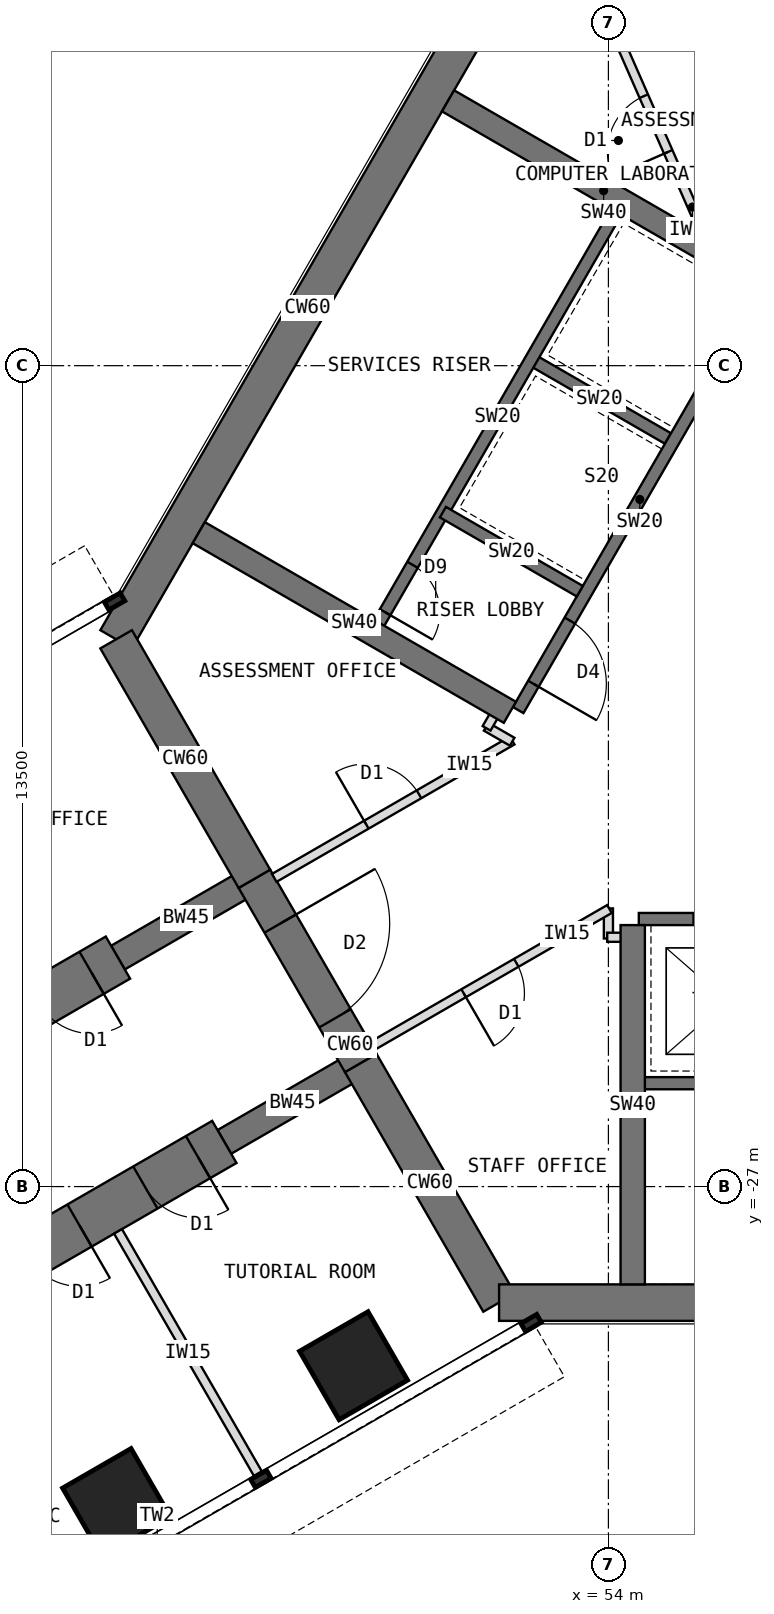
"""IFC4 building model, lengths in metres.
Left out: names, types, materials, properties, quantities, classifications, styles, units other than length and angle.
Written with IfcOpenShell. Run it as: python <this file> out.ifc"""

import sys

from ifc_helpers import new_model, si_unit, direction, frame, frame_2d, origin, origin_2d, place, context, subcontext, project, spatial, rectangle, extrude, element, fill, save


model = new_model("IFC4")
c1 = context("Model", 3, precision=1e-05, world=origin(), true_north=direction((0.0, 1.0)))
c2 = subcontext(c1, "Body", "Model", "MODEL_VIEW")
j1 = project(units=[si_unit("LENGTHUNIT", "METRE"), si_unit("PLANEANGLEUNIT", "RADIAN")], contexts=[c1])
p1 = place(None, origin())
s1 = spatial("IfcSite", under=j1, at=p1, CompositionType="ELEMENT")
p2 = place(p1, origin())
s2 = spatial("IfcBuilding", under=s1, at=p2, CompositionType="ELEMENT")
p3 = place(p2, frame((0.0, 0.0, 125.5)))
s3 = spatial("IfcBuildingStorey", under=s2, at=p3, CompositionType="ELEMENT", Elevation=125.5)
p4 = place(p3, frame((52.202, -7.092, 0.0), z_axis=(0.0, 0.0, 1.0), x_axis=(-0.500005998175, -0.866021940709, 0.0)))
e1 = element("IfcWall", 1, at=p4, inside=s3, PredefinedType="SHEAR", context=c2, shape_type="SweptSolid", body=[
    extrude(rectangle(XDim=12.596, YDim=0.6, at=frame_2d((6.298, 0.0))), origin(), (0.0, 0.0, 1.0), 4.0),
])
p5 = place(p3, frame((45.904, -18.0, 0.0), z_axis=(0.0, 0.0, 1.0), x_axis=(0.500024481964, -0.866011268655, 0.0)))
e2 = element("IfcWall", 2, at=p5, inside=s3, PredefinedType="SHEAR", context=c2, shape_type="SweptSolid", body=[
    extrude(rectangle(XDim=4.548, YDim=0.6, at=frame_2d((2.274, 0.0))), origin(), (0.0, 0.0, 1.0), 4.0),
])
p6 = place(p3, frame((48.178, -21.939, 0.0), z_axis=(0.0, 0.0, 1.0), x_axis=(0.500010275428, -0.866019471182, 0.0)))
e3 = element("IfcWall", 3, at=p6, inside=s3, PredefinedType="SHEAR", context=c2, shape_type="SweptSolid", body=[
    extrude(rectangle(XDim=3.5, YDim=0.6, at=frame_2d((1.75, 0.0))), origin(), (0.0, 0.0, 1.0), 4.0),
])
p7 = place(p6, frame((0.85, 0.0, 0.0)))
e4 = element("IfcOpeningElement", 4, at=p7, cuts=e3, PredefinedType="OPENING", context=c2, shape_type="SweptSolid", body=[
    extrude(rectangle(XDim=1.8, YDim=2.1, at=frame_2d((0.9, 1.05))), frame((0.0, 0.31, 0.0), z_axis=(0.0, -1.0, 0.0), x_axis=(1.0, 0.0, 0.0)), (0.0, 0.0, 1.0), 0.62),
])
p8 = place(p3, frame((49.928, -24.97, 0.0), z_axis=(0.0, 0.0, 1.0), x_axis=(0.499984222037, -0.866034513004, 0.0)))
e5 = element("IfcWall", 5, at=p8, inside=s3, PredefinedType="SHEAR", context=c2, shape_type="SweptSolid", body=[
    extrude(rectangle(XDim=4.548, YDim=0.6, at=frame_2d((2.274, 0.0))), origin(), (0.0, 0.0, 1.0), 4.0),
])
p9 = place(p3, frame((52.202, -28.908, 0.0), z_axis=(0.0, 0.0, 1.0), x_axis=(1.0, 0.0, 0.0)))
e6 = element("IfcWall", 6, at=p9, inside=s3, PredefinedType="SHEAR", context=c2, shape_type="SweptSolid", body=[
    extrude(rectangle(XDim=12.596, YDim=0.6, at=frame_2d((6.298, 0.0))), origin(), (0.0, 0.0, 1.0), 4.0),
])
p10 = place(p3, frame((49.928, -24.97, 0.0), z_axis=(0.0, 0.0, 1.0), x_axis=(-0.866031863473, -0.499988811324, 0.0)))
e7 = element("IfcWall", 7, at=p10, inside=s3, PredefinedType="SHEAR", context=c2, shape_type="SweptSolid", body=[
    extrude(rectangle(XDim=2.592, YDim=0.45, at=frame_2d((1.296, 0.0))), origin(), (0.0, 0.0, 1.0), 4.0),
])
p11 = place(p3, frame((47.684, -26.266, 0.0), z_axis=(0.0, 0.0, 1.0), x_axis=(-0.866027579429, -0.499996231654, 0.0)))
e8 = element("IfcWall", 8, at=p11, inside=s3, PredefinedType="SHEAR", context=c2, shape_type="SweptSolid", body=[
    extrude(rectangle(XDim=13.2, YDim=0.8, at=frame_2d((6.6, 0.0))), origin(), (0.0, 0.0, 1.0), 4.0),
])
p12 = place(p11, frame((0.5, 0.0, 0.0)))
e9 = element("IfcOpeningElement", 9, at=p12, cuts=e8, PredefinedType="OPENING", context=c2, shape_type="SweptSolid", body=[
    extrude(rectangle(XDim=1.0, YDim=2.1, at=frame_2d((0.5, 1.05))), frame((0.0, 0.41, 0.0), z_axis=(0.0, -1.0, 0.0), x_axis=(1.0, 0.0, 0.0)), (0.0, 0.0, 1.0), 0.82),
])
p13 = place(p11, frame((2.75, 0.0, 0.0)))
e10 = element("IfcOpeningElement", 10, at=p13, cuts=e8, PredefinedType="OPENING", context=c2, shape_type="SweptSolid", body=[
    extrude(rectangle(XDim=1.0, YDim=2.1, at=frame_2d((0.5, 1.05))), frame((0.0, 0.41, 0.0), z_axis=(0.0, -1.0, 0.0), x_axis=(1.0, 0.0, 0.0)), (0.0, 0.0, 1.0), 0.82),
])
p14 = place(p11, frame((7.25, 0.0, 0.0)))
e11 = element("IfcOpeningElement", 11, at=p14, cuts=e8, PredefinedType="OPENING", context=c2, shape_type="SweptSolid", body=[
    extrude(rectangle(XDim=1.0, YDim=2.1, at=frame_2d((0.5, 1.05))), frame((0.0, 0.41, 0.0), z_axis=(0.0, -1.0, 0.0), x_axis=(1.0, 0.0, 0.0)), (0.0, 0.0, 1.0), 0.82),
])
p15 = place(p3, frame((48.178, -21.939, 0.0), z_axis=(0.0, 0.0, 1.0), x_axis=(-0.866072649678, -0.499918158782, 0.0)))
e12 = element("IfcWall", 12, at=p15, inside=s3, PredefinedType="SHEAR", context=c2, shape_type="SweptSolid", body=[
    extrude(rectangle(XDim=2.592, YDim=0.45, at=frame_2d((1.296, 0.0))), origin(), (0.0, 0.0, 1.0), 4.0),
])
p16 = place(p3, frame((45.934, -23.234, 0.0), z_axis=(0.0, 0.0, 1.0), x_axis=(-0.866019570528, -0.500010103361, 0.0)))
e13 = element("IfcWall", 13, at=p16, inside=s3, PredefinedType="SHEAR", context=c2, shape_type="SweptSolid", body=[
    extrude(rectangle(XDim=13.2, YDim=0.8, at=frame_2d((6.6, 0.0))), origin(), (0.0, 0.0, 1.0), 4.0),
])
p17 = place(p16, frame((0.5, 0.0, 0.0)))
e14 = element("IfcOpeningElement", 14, at=p17, cuts=e13, PredefinedType="OPENING", context=c2, shape_type="SweptSolid", body=[
    extrude(rectangle(XDim=1.0, YDim=2.1, at=frame_2d((0.5, 1.05))), frame((0.0, 0.41, 0.0), z_axis=(0.0, -1.0, 0.0), x_axis=(1.0, 0.0, 0.0)), (0.0, 0.0, 1.0), 0.82),
])
p18 = place(p16, frame((2.75, 0.0, 0.0)))
e15 = element("IfcOpeningElement", 15, at=p18, cuts=e13, PredefinedType="OPENING", context=c2, shape_type="SweptSolid", body=[
    extrude(rectangle(XDim=1.0, YDim=2.1, at=frame_2d((0.5, 1.05))), frame((0.0, 0.41, 0.0), z_axis=(0.0, -1.0, 0.0), x_axis=(1.0, 0.0, 0.0)), (0.0, 0.0, 1.0), 0.82),
])
p19 = place(p16, frame((7.25, 0.0, 0.0)))
e16 = element("IfcOpeningElement", 16, at=p19, cuts=e13, PredefinedType="OPENING", context=c2, shape_type="SweptSolid", body=[
    extrude(rectangle(XDim=1.0, YDim=2.1, at=frame_2d((0.5, 1.05))), frame((0.0, 0.41, 0.0), z_axis=(0.0, -1.0, 0.0), x_axis=(1.0, 0.0, 0.0)), (0.0, 0.0, 1.0), 0.82),
])
for number, where, z_axis, x_axis in (
    (17, (49.809, -29.946, 0.0), (0.0, 0.0, 1.0), (0.866, 0.5, 0.0)),
    (18, (45.912, -32.196, 0.0), (0.0, 0.0, 1.0), (0.866, 0.5, 0.0)),
):
    element("IfcColumn", number, at=place(p3, frame(where, z_axis=z_axis, x_axis=x_axis)), inside=s3, PredefinedType="COLUMN", context=c2, shape_type="SweptSolid", body=[
        extrude(rectangle(XDim=1.3, YDim=1.3, at=origin_2d()), origin(), (0.0, 0.0, 1.0), 4.0),
    ])
p20 = place(p3, frame((56.516, -12.236, 0.0), z_axis=(0.0, 0.0, 1.0), x_axis=(-0.49999894854, -0.866026010844, 0.0)))
e19 = element("IfcWall", 19, at=p20, inside=s3, PredefinedType="SHEAR", context=c2, shape_type="SweptSolid", body=[
    extrude(rectangle(XDim=8.0, YDim=0.2, at=frame_2d((4.0, 0.0))), origin(), (0.0, 0.0, 1.0), 4.0),
])
p21 = place(p20, frame((6.3, 0.0, 0.0)))
e20 = element("IfcOpeningElement", 20, at=p21, cuts=e19, PredefinedType="OPENING", context=c2, shape_type="SweptSolid", body=[
    extrude(rectangle(XDim=1.2, YDim=2.1, at=frame_2d((0.6, 1.05))), frame((0.0, 0.11, 0.0), z_axis=(0.0, -1.0, 0.0), x_axis=(1.0, 0.0, 0.0)), (0.0, 0.0, 1.0), 0.22),
])
for number, where, z_axis, x_axis in (
    (21, (54.98, -14.697, 0.0), (0.0, 0.0, 1.0), (-0.866, 0.5, 0.0)),
    (22, (53.53, -17.209, 0.0), (0.0, 0.0, 1.0), (-0.866, 0.5, 0.0)),
):
    element("IfcWall", number, at=place(p3, frame(where, z_axis=z_axis, x_axis=x_axis)), inside=s3, PredefinedType="SHEAR", context=c2, shape_type="SweptSolid", body=[
        extrude(rectangle(XDim=2.6, YDim=0.2, at=frame_2d((1.3, 0.0))), origin(), (0.0, 0.0, 1.0), 4.0),
    ])
p22 = place(p3, frame((54.178, -10.886, 0.0), z_axis=(0.0, 0.0, 1.0), x_axis=(-0.49999894854, -0.866026010844, 0.0)))
e23 = element("IfcWall", 23, at=p22, inside=s3, PredefinedType="SHEAR", context=c2, shape_type="SweptSolid", body=[
    extrude(rectangle(XDim=8.0, YDim=0.2, at=frame_2d((4.0, 0.0))), origin(), (0.0, 0.0, 1.0), 4.0),
])
p23 = place(p22, frame((6.8, 0.0, 0.0)))
e24 = element("IfcOpeningElement", 24, at=p23, cuts=e23, PredefinedType="OPENING", context=c2, shape_type="SweptSolid", body=[
    extrude(rectangle(XDim=0.9, YDim=2.1, at=frame_2d((0.45, 1.05))), frame((0.0, 0.11, 0.0), z_axis=(0.0, -1.0, 0.0), x_axis=(1.0, 0.0, 0.0)), (0.0, 0.0, 1.0), 0.22),
])
p24 = place(p3, frame((52.38, -19.201, 0.0), z_axis=(0.0, 0.0, 1.0), x_axis=(-0.866027317282, 0.49999668571, 0.0)))
e25 = element("IfcWall", 25, at=p24, inside=s3, PredefinedType="SHEAR", context=c2, shape_type="SweptSolid", body=[
    extrude(rectangle(XDim=5.908, YDim=0.4, at=frame_2d((2.954, 0.0))), origin(), (0.0, 0.0, 1.0), 4.0),
])
p25 = place(p3, frame((56.48, -12.099, 0.0), z_axis=(0.0, 0.0, 1.0), x_axis=(-0.866009424208, 0.500027676417, 0.0)))
e26 = element("IfcWall", 26, at=p25, inside=s3, PredefinedType="SHEAR", context=c2, shape_type="SweptSolid", body=[
    extrude(rectangle(XDim=5.908, YDim=0.4, at=frame_2d((2.954, 0.0))), origin(), (0.0, 0.0, 1.0), 4.0),
])
p26 = place(p3, frame((54.5, -22.6, 0.0), z_axis=(0.0, 0.0, 1.0), x_axis=(1.0, 0.0, 0.0)))
e27 = element("IfcWall", 27, at=p26, inside=s3, PredefinedType="SHEAR", context=c2, shape_type="SweptSolid", body=[
    extrude(rectangle(XDim=8.0, YDim=0.2, at=frame_2d((4.0, 0.0))), origin(), (0.0, 0.0, 1.0), 4.0),
])
p27 = place(p26, frame((6.3, 0.0, 0.0)))
e28 = element("IfcOpeningElement", 28, at=p27, cuts=e27, PredefinedType="OPENING", context=c2, shape_type="SweptSolid", body=[
    extrude(rectangle(XDim=1.2, YDim=2.1, at=frame_2d((0.6, 1.05))), frame((0.0, 0.11, 0.0), z_axis=(0.0, -1.0, 0.0), x_axis=(1.0, 0.0, 0.0)), (0.0, 0.0, 1.0), 0.22),
])
p28 = place(p26, frame((0.9, 0.0, 0.0)))
e29 = element("IfcOpeningElement", 29, at=p28, cuts=e27, PredefinedType="OPENING", context=c2, shape_type="SweptSolid", body=[
    extrude(rectangle(XDim=1.1, YDim=2.2, at=frame_2d((0.55, 1.1))), frame((0.0, 0.11, 0.0), z_axis=(0.0, -1.0, 0.0), x_axis=(1.0, 0.0, 0.0)), (0.0, 0.0, 1.0), 0.22),
])
p29 = place(p3, frame((54.5, -25.3, 0.0), z_axis=(0.0, 0.0, 1.0), x_axis=(1.0, 0.0, 0.0)))
e30 = element("IfcWall", 30, at=p29, inside=s3, PredefinedType="SHEAR", context=c2, shape_type="SweptSolid", body=[
    extrude(rectangle(XDim=8.0, YDim=0.2, at=frame_2d((4.0, 0.0))), origin(), (0.0, 0.0, 1.0), 4.0),
])
p30 = place(p29, frame((6.7, 0.0, 0.0)))
e31 = element("IfcOpeningElement", 31, at=p30, cuts=e30, PredefinedType="OPENING", context=c2, shape_type="SweptSolid", body=[
    extrude(rectangle(XDim=1.1, YDim=2.1, at=frame_2d((0.55, 1.05))), frame((0.0, 0.11, 0.0), z_axis=(0.0, -1.0, 0.0), x_axis=(1.0, 0.0, 0.0)), (0.0, 0.0, 1.0), 0.22),
])
p31 = place(p3, frame((54.4, -22.7, 0.0), z_axis=(0.0, 0.0, 1.0), x_axis=(0.0, -1.0, 0.0)))
e32 = element("IfcWall", 32, at=p31, inside=s3, PredefinedType="SHEAR", context=c2, shape_type="SweptSolid", body=[
    extrude(rectangle(XDim=5.908, YDim=0.4, at=frame_2d((2.954, 0.0))), origin(), (0.0, 0.0, 1.0), 4.0),
])
p32 = place(p3, frame((45.935, -27.737, 0.0), z_axis=(0.0, 0.0, 1.0), x_axis=(0.500014953309, -0.866016770315, 0.0)))
e33 = element("IfcWall", 33, at=p32, inside=s3, PredefinedType="PARTITIONING", context=c2, shape_type="SweptSolid", body=[
    extrude(rectangle(XDim=4.6, YDim=0.15, at=frame_2d((2.3, 0.0))), origin(), (0.0, 0.0, 1.0), 3.8),
])
p33 = place(p3, frame((54.0, -22.92, 0.0), z_axis=(0.0, 0.0, 1.0), x_axis=(0.0, 1.0, 0.0)))
e34 = element("IfcWall", 34, at=p33, inside=s3, PredefinedType="PARTITIONING", context=c2, shape_type="SweptSolid", body=[
    extrude(rectangle(XDim=0.494, YDim=0.15, at=frame_2d((0.247, 0.0))), origin(), (0.0, 0.0, 1.0), 3.8),
])
p34 = place(p3, frame((54.017, -22.436, 0.0), z_axis=(0.0, 0.0, 1.0), x_axis=(-0.86602002524, -0.500009315796, 0.0)))
e35 = element("IfcWall", 35, at=p34, inside=s3, PredefinedType="PARTITIONING", context=c2, shape_type="SweptSolid", body=[
    extrude(rectangle(XDim=4.519, YDim=0.15, at=frame_2d((2.259, 0.0))), origin(), (0.0, 0.0, 1.0), 3.8),
])
p35 = place(p34, frame((1.769, 0.0, 0.0)))
e36 = element("IfcOpeningElement", 36, at=p35, cuts=e35, PredefinedType="OPENING", context=c2, shape_type="SweptSolid", body=[
    extrude(rectangle(XDim=1.0, YDim=2.1, at=frame_2d((0.5, 1.05))), frame((0.0, 0.085, 0.0), z_axis=(0.0, -1.0, 0.0), x_axis=(1.0, 0.0, 0.0)), (0.0, 0.0, 1.0), 0.17),
])
p36 = place(p3, frame((48.504, -21.924, 0.0), z_axis=(0.0, 0.0, 1.0), x_axis=(0.866006515865, 0.500032713409, 0.0)))
e37 = element("IfcWall", 37, at=p36, inside=s3, PredefinedType="PARTITIONING", context=c2, shape_type="SweptSolid", body=[
    extrude(rectangle(XDim=4.518, YDim=0.15, at=frame_2d((2.259, 0.0))), origin(), (0.0, 0.0, 1.0), 3.8),
])
p37 = place(p36, frame((1.749, 0.0, 0.0)))
e38 = element("IfcOpeningElement", 38, at=p37, cuts=e37, PredefinedType="OPENING", context=c2, shape_type="SweptSolid", body=[
    extrude(rectangle(XDim=1.0, YDim=2.1, at=frame_2d((0.5, 1.05))), frame((0.0, 0.085, 0.0), z_axis=(0.0, -1.0, 0.0), x_axis=(1.0, 0.0, 0.0)), (0.0, 0.0, 1.0), 0.17),
])
p38 = place(p3, frame((52.417, -19.684, 0.0), z_axis=(0.0, 0.0, 1.0), x_axis=(-0.865831790172, 0.50033519877, 0.0)))
e39 = element("IfcWall", 39, at=p38, inside=s3, PredefinedType="PARTITIONING", context=c2, shape_type="SweptSolid", body=[
    extrude(rectangle(XDim=0.494, YDim=0.15, at=frame_2d((0.247, 0.0))), origin(), (0.0, 0.0, 1.0), 3.8),
])
for number, where, z_axis, x_axis in (
    (40, (51.997, -19.464, 0.0), (0.0, 0.0, 1.0), (0.5, 0.866, 0.0)),
    (41, (54.41, -22.9, 0.0), (0.0, 0.0, 1.0), (-1.0, 0.0, 0.0)),
):
    element("IfcWall", number, at=place(p3, frame(where, z_axis=z_axis, x_axis=x_axis)), inside=s3, PredefinedType="PARTITIONING", context=c2, shape_type="SweptSolid", body=[
        extrude(rectangle(XDim=0.43, YDim=0.15, at=frame_2d((0.215, 0.0))), origin(), (0.0, 0.0, 1.0), 3.8),
    ])
p39 = place(p3, frame((55.719, -11.66, 0.0), z_axis=(0.0, 0.0, 1.0), x_axis=(-0.401686926791, 0.915777054116, 0.0)))
e42 = element("IfcWall", 42, at=p39, inside=s3, PredefinedType="PARTITIONING", context=c2, shape_type="SweptSolid", body=[
    extrude(rectangle(XDim=4.661, YDim=0.15, at=frame_2d((2.331, 0.0))), origin(), (0.0, 0.0, 1.0), 3.8),
])
p40 = place(p39, frame((1.831, 0.0, 0.0)))
e43 = element("IfcOpeningElement", 43, at=p40, cuts=e42, PredefinedType="OPENING", context=c2, shape_type="SweptSolid", body=[
    extrude(rectangle(XDim=1.0, YDim=2.1, at=frame_2d((0.5, 1.05))), frame((0.0, 0.085, 0.0), z_axis=(0.0, -1.0, 0.0), x_axis=(1.0, 0.0, 0.0)), (0.0, 0.0, 1.0), 0.17),
])
p41 = place(p21, origin())
e44 = element("IfcDoor", 44, at=p41, inside=s3, OperationType="SINGLE_SWING_RIGHT", PredefinedType="DOOR", context=c2, shape_type="SweptSolid", body=[
    extrude(rectangle(XDim=1.2, YDim=2.1, at=frame_2d((0.6, 1.05))), frame((0.0, 0.025, 0.0), z_axis=(0.0, -1.0, 0.0), x_axis=(1.0, 0.0, 0.0)), (0.0, 0.0, 1.0), 0.05),
])
fill(e20, e44)
p42 = place(p23, origin())
e45 = element("IfcDoor", 45, at=p42, inside=s3, OperationType="SINGLE_SWING_RIGHT", PredefinedType="DOOR", context=c2, shape_type="SweptSolid", body=[
    extrude(rectangle(XDim=0.9, YDim=2.1, at=frame_2d((0.45, 1.05))), frame((0.0, 0.025, 0.0), z_axis=(0.0, -1.0, 0.0), x_axis=(1.0, 0.0, 0.0)), (0.0, 0.0, 1.0), 0.05),
])
fill(e24, e45)
p43 = place(p7, origin())
e46 = element("IfcDoor", 46, at=p43, inside=s3, OperationType="DOUBLE_DOOR_DOUBLE_SWING", PredefinedType="DOOR", context=c2, shape_type="SweptSolid", body=[
    extrude(rectangle(XDim=1.72, YDim=2.06, at=frame_2d((0.9, 1.03))), frame((0.0, 0.025, 0.0), z_axis=(0.0, -1.0, 0.0), x_axis=(1.0, 0.0, 0.0)), (0.0, 0.0, 1.0), 0.05),
    extrude(rectangle(XDim=0.04, YDim=2.1, at=frame_2d((0.02, 1.05))), frame((0.0, 0.3, 0.0), z_axis=(0.0, -1.0, 0.0), x_axis=(1.0, 0.0, 0.0)), (0.0, 0.0, 1.0), 0.6),
    extrude(rectangle(XDim=0.04, YDim=2.1, at=frame_2d((1.78, 1.05))), frame((0.0, 0.3, 0.0), z_axis=(0.0, -1.0, 0.0), x_axis=(1.0, 0.0, 0.0)), (0.0, 0.0, 1.0), 0.6),
    extrude(rectangle(XDim=1.72, YDim=0.04, at=frame_2d((0.9, 2.08))), frame((0.0, 0.3, 0.0), z_axis=(0.0, -1.0, 0.0), x_axis=(1.0, 0.0, 0.0)), (0.0, 0.0, 1.0), 0.6),
])
fill(e4, e46)
p44 = place(p37, origin())
e47 = element("IfcDoor", 47, at=p44, inside=s3, OperationType="SINGLE_SWING_LEFT", PredefinedType="DOOR", context=c2, shape_type="SweptSolid", body=[
    extrude(rectangle(XDim=1.0, YDim=2.1, at=frame_2d((0.5, 1.05))), frame((0.0, 0.025, 0.0), z_axis=(0.0, -1.0, 0.0), x_axis=(1.0, 0.0, 0.0)), (0.0, 0.0, 1.0), 0.05),
])
fill(e38, e47)
p45 = place(p35, origin())
e48 = element("IfcDoor", 48, at=p45, inside=s3, OperationType="SINGLE_SWING_RIGHT", PredefinedType="DOOR", context=c2, shape_type="SweptSolid", body=[
    extrude(rectangle(XDim=1.0, YDim=2.1, at=frame_2d((0.5, 1.05))), frame((0.0, 0.025, 0.0), z_axis=(0.0, -1.0, 0.0), x_axis=(1.0, 0.0, 0.0)), (0.0, 0.0, 1.0), 0.05),
])
fill(e36, e48)
p46 = place(p40, origin())
e49 = element("IfcDoor", 49, at=p46, inside=s3, OperationType="SINGLE_SWING_LEFT", PredefinedType="DOOR", context=c2, shape_type="SweptSolid", body=[
    extrude(rectangle(XDim=1.0, YDim=2.1, at=frame_2d((0.5, 1.05))), frame((0.0, 0.025, 0.0), z_axis=(0.0, -1.0, 0.0), x_axis=(1.0, 0.0, 0.0)), (0.0, 0.0, 1.0), 0.05),
])
fill(e43, e49)
p47 = place(p12, origin())
e50 = element("IfcDoor", 50, at=p47, inside=s3, OperationType="SINGLE_SWING_LEFT", PredefinedType="DOOR", context=c2, shape_type="SweptSolid", body=[
    extrude(rectangle(XDim=0.92, YDim=2.06, at=frame_2d((0.5, 1.03))), frame((0.0, 0.025, 0.0), z_axis=(0.0, -1.0, 0.0), x_axis=(1.0, 0.0, 0.0)), (0.0, 0.0, 1.0), 0.05),
    extrude(rectangle(XDim=0.04, YDim=2.1, at=frame_2d((0.02, 1.05))), frame((0.0, 0.4, 0.0), z_axis=(0.0, -1.0, 0.0), x_axis=(1.0, 0.0, 0.0)), (0.0, 0.0, 1.0), 0.8),
    extrude(rectangle(XDim=0.04, YDim=2.1, at=frame_2d((0.98, 1.05))), frame((0.0, 0.4, 0.0), z_axis=(0.0, -1.0, 0.0), x_axis=(1.0, 0.0, 0.0)), (0.0, 0.0, 1.0), 0.8),
    extrude(rectangle(XDim=0.92, YDim=0.04, at=frame_2d((0.5, 2.08))), frame((0.0, 0.4, 0.0), z_axis=(0.0, -1.0, 0.0), x_axis=(1.0, 0.0, 0.0)), (0.0, 0.0, 1.0), 0.8),
])
fill(e9, e50)
p48 = place(p13, origin())
e51 = element("IfcDoor", 51, at=p48, inside=s3, OperationType="SINGLE_SWING_LEFT", PredefinedType="DOOR", context=c2, shape_type="SweptSolid", body=[
    extrude(rectangle(XDim=0.92, YDim=2.06, at=frame_2d((0.5, 1.03))), frame((0.0, 0.025, 0.0), z_axis=(0.0, -1.0, 0.0), x_axis=(1.0, 0.0, 0.0)), (0.0, 0.0, 1.0), 0.05),
    extrude(rectangle(XDim=0.04, YDim=2.1, at=frame_2d((0.02, 1.05))), frame((0.0, 0.4, 0.0), z_axis=(0.0, -1.0, 0.0), x_axis=(1.0, 0.0, 0.0)), (0.0, 0.0, 1.0), 0.8),
    extrude(rectangle(XDim=0.04, YDim=2.1, at=frame_2d((0.98, 1.05))), frame((0.0, 0.4, 0.0), z_axis=(0.0, -1.0, 0.0), x_axis=(1.0, 0.0, 0.0)), (0.0, 0.0, 1.0), 0.8),
    extrude(rectangle(XDim=0.92, YDim=0.04, at=frame_2d((0.5, 2.08))), frame((0.0, 0.4, 0.0), z_axis=(0.0, -1.0, 0.0), x_axis=(1.0, 0.0, 0.0)), (0.0, 0.0, 1.0), 0.8),
])
fill(e10, e51)
p49 = place(p17, origin())
e52 = element("IfcDoor", 52, at=p49, inside=s3, OperationType="SINGLE_SWING_LEFT", PredefinedType="DOOR", context=c2, shape_type="SweptSolid", body=[
    extrude(rectangle(XDim=0.92, YDim=2.06, at=frame_2d((0.5, 1.03))), frame((0.0, 0.025, 0.0), z_axis=(0.0, -1.0, 0.0), x_axis=(1.0, 0.0, 0.0)), (0.0, 0.0, 1.0), 0.05),
    extrude(rectangle(XDim=0.04, YDim=2.1, at=frame_2d((0.02, 1.05))), frame((0.0, 0.4, 0.0), z_axis=(0.0, -1.0, 0.0), x_axis=(1.0, 0.0, 0.0)), (0.0, 0.0, 1.0), 0.8),
    extrude(rectangle(XDim=0.04, YDim=2.1, at=frame_2d((0.98, 1.05))), frame((0.0, 0.4, 0.0), z_axis=(0.0, -1.0, 0.0), x_axis=(1.0, 0.0, 0.0)), (0.0, 0.0, 1.0), 0.8),
    extrude(rectangle(XDim=0.92, YDim=0.04, at=frame_2d((0.5, 2.08))), frame((0.0, 0.4, 0.0), z_axis=(0.0, -1.0, 0.0), x_axis=(1.0, 0.0, 0.0)), (0.0, 0.0, 1.0), 0.8),
])
fill(e14, e52)
save(model, sys.argv[1])
